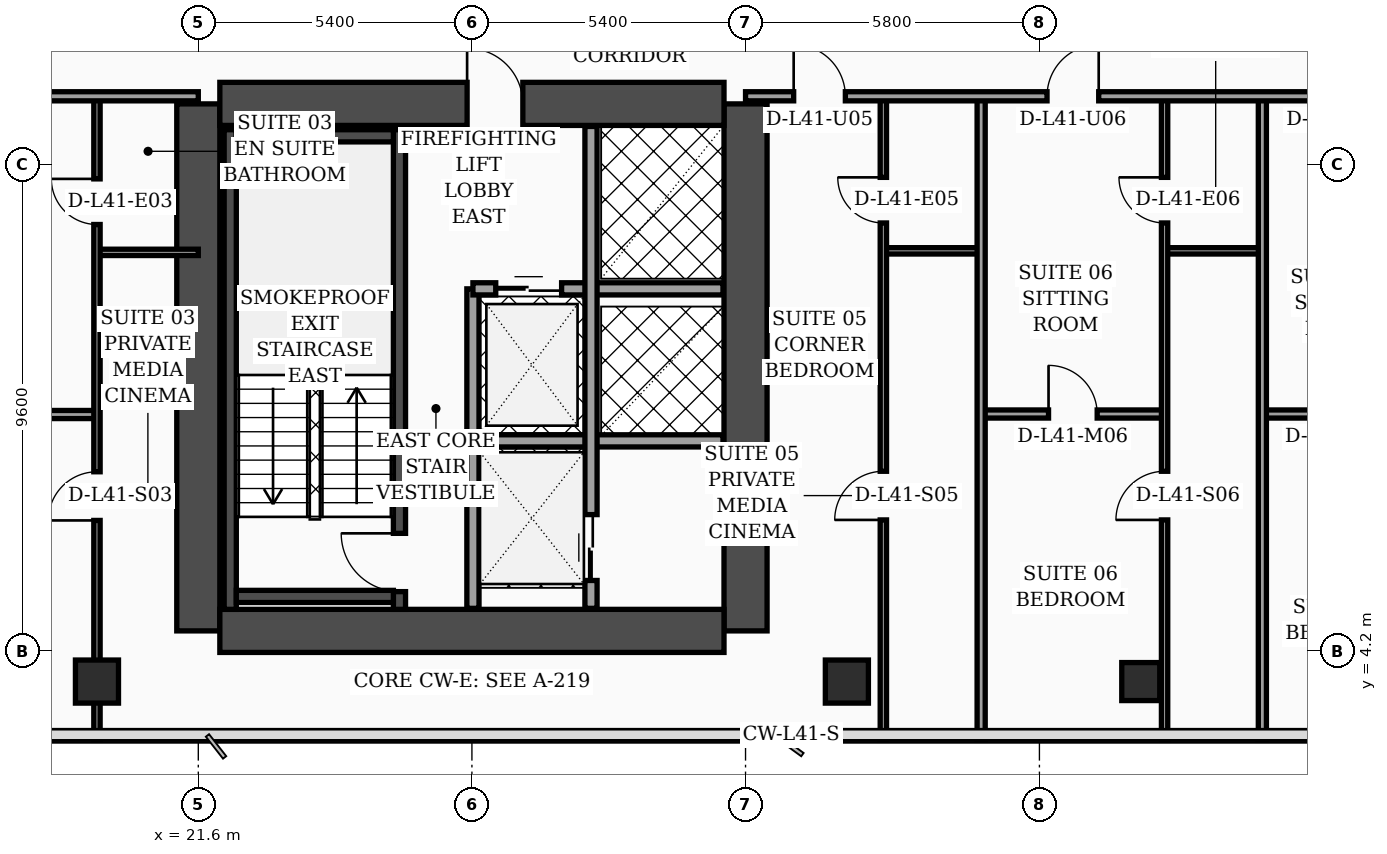
"""IFC4 building model, lengths in metres.
Left out: names, types, materials, properties, quantities, classifications, styles, units other than length and angle.
Written with IfcOpenShell. Run it as: python <this file> out.ifc"""

import sys

from ifc_helpers import new_model, si_unit, direction, frame, frame_2d, origin, origin_2d, place, context, subcontext, project, spatial, rectangle, hollow_rectangle, extrude, element, fill, save


model = new_model("IFC4")
c1 = context("Model", 3, precision=1e-05, world=origin(), true_north=direction((0.0, 1.0)))
c2 = subcontext(c1, "Body", "Model", "MODEL_VIEW")
j1 = project(units=[si_unit("LENGTHUNIT", "METRE"), si_unit("PLANEANGLEUNIT", "RADIAN")], contexts=[c1])
p1 = place(None, origin())
s1 = spatial("IfcSite", under=j1, at=p1, CompositionType="ELEMENT")
p2 = place(p1, origin())
s2 = spatial("IfcBuilding", under=s1, at=p2, CompositionType="ELEMENT")
p3 = place(p2, frame((0.0, 0.0, 167.5)))
s3 = spatial("IfcBuildingStorey", under=s2, at=p3, CompositionType="ELEMENT", Elevation=167.5)
for number, where, z_axis, x_axis in (
    (1, (21.6, 4.6, 0.0), (0.0, 0.0, 1.0), (0.0, 1.0, 0.0)),
    (2, (32.4, 4.6, 0.0), (0.0, 0.0, 1.0), (0.0, 1.0, 0.0)),
):
    element("IfcWall", number, at=place(p3, frame(where, z_axis=z_axis, x_axis=x_axis)), inside=s3, PredefinedType="SHEAR", context=c2, shape_type="SweptSolid", body=[
        extrude(rectangle(XDim=10.4, YDim=0.85, at=frame_2d((5.2, 0.0))), origin(), (0.0, 0.0, 1.0), 3.56),
    ])
p4 = place(p3, frame((22.025, 15.0, 0.0), z_axis=(0.0, 0.0, 1.0), x_axis=(1.0, 0.0, 0.0)))
e3 = element("IfcWall", 3, at=p4, inside=s3, PredefinedType="SHEAR", context=c2, shape_type="SweptSolid", body=[
    extrude(rectangle(XDim=9.95, YDim=0.85, at=frame_2d((4.975, 0.0))), origin(), (0.0, 0.0, 1.0), 3.56),
])
p5 = place(p4, frame((4.88, 0.0, 0.0)))
e4 = element("IfcOpeningElement", 4, at=p5, cuts=e3, PredefinedType="OPENING", context=c2, shape_type="SweptSolid", body=[
    extrude(rectangle(XDim=1.1, YDim=2.2, at=frame_2d((0.55, 1.1))), frame((0.0, 0.435, 0.0), z_axis=(0.0, -1.0, 0.0), x_axis=(1.0, 0.0, 0.0)), (0.0, 0.0, 1.0), 0.87),
])
p6 = place(p3, frame((22.025, 4.6, 0.0), z_axis=(0.0, 0.0, 1.0), x_axis=(1.0, 0.0, 0.0)))
e5 = element("IfcWall", 5, at=p6, inside=s3, PredefinedType="SHEAR", context=c2, shape_type="SweptSolid", body=[
    extrude(rectangle(XDim=9.95, YDim=0.85, at=frame_2d((4.975, 0.0))), origin(), (0.0, 0.0, 1.0), 3.56),
])
p7 = place(p3, frame((22.23, 5.025, 0.0), z_axis=(0.0, 0.0, 1.0), x_axis=(0.0, 1.0, 0.0)))
e6 = element("IfcWall", 6, at=p7, inside=s3, PredefinedType="SOLIDWALL", context=c2, shape_type="SweptSolid", body=[
    extrude(rectangle(XDim=9.465, YDim=0.24, at=frame_2d((4.732, 0.0))), origin(), (0.0, 0.0, 1.0), 3.56),
])
p8 = place(p3, frame((25.57, 5.025, 0.0), z_axis=(0.0, 0.0, 1.0), x_axis=(0.0, 1.0, 0.0)))
e7 = element("IfcWall", 7, at=p8, inside=s3, PredefinedType="SOLIDWALL", context=c2, shape_type="SweptSolid", body=[
    extrude(rectangle(XDim=9.465, YDim=0.24, at=frame_2d((4.732, 0.0))), origin(), (0.0, 0.0, 1.0), 3.56),
])
p9 = place(p8, frame((0.35, 0.0, 0.0)))
e8 = element("IfcOpeningElement", 8, at=p9, cuts=e7, PredefinedType="OPENING", context=c2, shape_type="SweptSolid", body=[
    extrude(rectangle(XDim=1.15, YDim=2.2, at=frame_2d((0.575, 1.1))), frame((0.0, 0.13, 0.0), z_axis=(0.0, -1.0, 0.0), x_axis=(1.0, 0.0, 0.0)), (0.0, 0.0, 1.0), 0.26),
])
for number, where, z_axis, x_axis in (
    (9, (22.35, 5.28, 0.0), (0.0, 0.0, 1.0), (1.0, 0.0, 0.0)),
    (10, (22.35, 14.37, 0.0), (0.0, 0.0, 1.0), (1.0, 0.0, 0.0)),
):
    element("IfcWall", number, at=place(p3, frame(where, z_axis=z_axis, x_axis=x_axis)), inside=s3, PredefinedType="SOLIDWALL", context=c2, shape_type="SweptSolid", body=[
        extrude(rectangle(XDim=3.1, YDim=0.24, at=frame_2d((1.55, 0.0))), origin(), (0.0, 0.0, 1.0), 3.56),
    ])
for number, where, z_axis, x_axis in (
    (11, (19.6, 3.6, 0.0), (0.0, 0.0, 1.0), (1.0, 0.0, 0.0)),
    (12, (34.4, 3.6, 0.0), (0.0, 0.0, 1.0), (1.0, 0.0, 0.0)),
):
    element("IfcColumn", number, at=place(p3, frame(where, z_axis=z_axis, x_axis=x_axis)), inside=s3, PredefinedType="COLUMN", context=c2, shape_type="SweptSolid", body=[
        extrude(hollow_rectangle(XDim=0.85, YDim=0.85, WallThickness=0.036, at=origin_2d()), origin(), (0.0, 0.0, 1.0), 3.56),
    ])
p10 = place(p3, frame((40.2, 3.6, 0.0), z_axis=(0.0, 0.0, 1.0), x_axis=(1.0, 0.0, 0.0)))
e13 = element("IfcColumn", 13, at=p10, inside=s3, PredefinedType="COLUMN", context=c2, shape_type="SweptSolid", body=[
    extrude(hollow_rectangle(XDim=0.75, YDim=0.75, WallThickness=0.032, at=origin_2d()), origin(), (0.0, 0.0, 1.0), 3.56),
])
p11 = place(p3, frame((27.02, 5.045, 0.0), z_axis=(0.0, 0.0, 1.0), x_axis=(0.0, 1.0, 0.0)))
e14 = element("IfcWall", 14, at=p11, inside=s3, PredefinedType="SOLIDWALL", context=c2, shape_type="SweptSolid", body=[
    extrude(rectangle(XDim=6.305, YDim=0.24, at=frame_2d((3.153, 0.0))), origin(), (0.0, 0.0, 1.0), 3.56),
])
p12 = place(p3, frame((27.02, 11.35, 0.0), z_axis=(0.0, 0.0, 1.0), x_axis=(1.0, 0.0, 0.0)))
e15 = element("IfcWall", 15, at=p12, inside=s3, PredefinedType="SOLIDWALL", context=c2, shape_type="SweptSolid", body=[
    extrude(rectangle(XDim=4.935, YDim=0.24, at=frame_2d((2.468, 0.0))), origin(), (0.0, 0.0, 1.0), 3.56),
])
p13 = place(p12, frame((0.45, 0.0, 0.0)))
e16 = element("IfcOpeningElement", 16, at=p13, cuts=e15, PredefinedType="OPENING", context=c2, shape_type="SweptSolid", body=[
    extrude(rectangle(XDim=1.3, YDim=2.35, at=frame_2d((0.65, 1.175))), frame((0.0, 0.13, 0.0), z_axis=(0.0, -1.0, 0.0), x_axis=(1.0, 0.0, 0.0)), (0.0, 0.0, 1.0), 0.26),
])
p14 = place(p3, frame((27.02, 8.35, 0.0), z_axis=(0.0, 0.0, 1.0), x_axis=(1.0, 0.0, 0.0)))
e17 = element("IfcWall", 17, at=p14, inside=s3, PredefinedType="SOLIDWALL", context=c2, shape_type="SweptSolid", body=[
    extrude(rectangle(XDim=4.935, YDim=0.24, at=frame_2d((2.468, 0.0))), origin(), (0.0, 0.0, 1.0), 3.09),
])
p15 = place(p3, frame((29.35, 5.045, 0.0), z_axis=(0.0, 0.0, 1.0), x_axis=(0.0, 1.0, 0.0)))
e18 = element("IfcWall", 18, at=p15, inside=s3, PredefinedType="SOLIDWALL", context=c2, shape_type="SweptSolid", body=[
    extrude(rectangle(XDim=9.51, YDim=0.24, at=frame_2d((4.755, 0.0))), origin(), (0.0, 0.0, 1.0), 3.56),
])
p16 = place(p15, frame((0.55, 0.0, 0.0)))
e19 = element("IfcOpeningElement", 19, at=p16, cuts=e18, PredefinedType="OPENING", context=c2, shape_type="SweptSolid", body=[
    extrude(rectangle(XDim=1.3, YDim=2.35, at=frame_2d((0.65, 1.175))), frame((0.0, 0.13, 0.0), z_axis=(0.0, -1.0, 0.0), x_axis=(1.0, 0.0, 0.0)), (0.0, 0.0, 1.0), 0.26),
])
p17 = place(p3, frame((19.6, 12.07, 0.0), z_axis=(0.0, 0.0, 1.0), x_axis=(1.0, 0.0, 0.0)))
e20 = element("IfcWall", 20, at=p17, inside=s3, PredefinedType="PARTITIONING", context=c2, shape_type="SweptSolid", body=[
    extrude(rectangle(XDim=2.0, YDim=0.125, at=frame_2d((1.0, 0.0))), origin(), (0.0, 0.0, 1.0), 3.56),
])
p18 = place(p3, frame((15.15, 8.87, 0.0), z_axis=(0.0, 0.0, 1.0), x_axis=(1.0, 0.0, 0.0)))
e21 = element("IfcWall", 21, at=p18, inside=s3, PredefinedType="PARTITIONING", context=c2, shape_type="SweptSolid", body=[
    extrude(rectangle(XDim=4.45, YDim=0.16, at=frame_2d((2.225, 0.0))), origin(), (0.0, 0.0, 1.0), 3.56),
])
p19 = place(p18, frame((1.75, 0.0, 0.0)))
e22 = element("IfcOpeningElement", 22, at=p19, cuts=e21, PredefinedType="OPENING", context=c2, shape_type="SweptSolid", body=[
    extrude(rectangle(XDim=0.96, YDim=2.2, at=frame_2d((0.48, 1.1))), frame((0.0, 0.09, 0.0), z_axis=(0.0, -1.0, 0.0), x_axis=(1.0, 0.0, 0.0)), (0.0, 0.0, 1.0), 0.18),
])
p20 = place(p3, frame((19.6, 2.44, 0.0), z_axis=(0.0, 0.0, 1.0), x_axis=(0.0, 1.0, 0.0)))
e23 = element("IfcWall", 23, at=p20, inside=s3, PredefinedType="PARTITIONING", context=c2, shape_type="SweptSolid", body=[
    extrude(rectangle(XDim=12.71, YDim=0.125, at=frame_2d((6.355, 0.0))), origin(), (0.0, 0.0, 1.0), 2.49),
])
p21 = place(p20, frame((4.34, 0.0, 0.0)))
e24 = element("IfcOpeningElement", 24, at=p21, cuts=e23, PredefinedType="OPENING", context=c2, shape_type="SweptSolid", body=[
    extrude(rectangle(XDim=0.96, YDim=2.2, at=frame_2d((0.48, 1.1))), frame((0.0, 0.073, 0.0), z_axis=(0.0, -1.0, 0.0), x_axis=(1.0, 0.0, 0.0)), (0.0, 0.0, 1.0), 0.145),
])
p22 = place(p20, frame((10.18, 0.0, 0.0)))
e25 = element("IfcOpeningElement", 25, at=p22, cuts=e23, PredefinedType="OPENING", context=c2, shape_type="SweptSolid", body=[
    extrude(rectangle(XDim=0.9, YDim=2.15, at=frame_2d((0.45, 1.075))), frame((0.0, 0.073, 0.0), z_axis=(0.0, -1.0, 0.0), x_axis=(1.0, 0.0, 0.0)), (0.0, 0.0, 1.0), 0.145),
])
p23 = place(p3, frame((15.15, 15.15, 0.0), z_axis=(0.0, 0.0, 1.0), x_axis=(1.0, 0.0, 0.0)))
e26 = element("IfcWall", 26, at=p23, inside=s3, PredefinedType="PARTITIONING", context=c2, shape_type="SweptSolid", body=[
    extrude(rectangle(XDim=6.45, YDim=0.18, at=frame_2d((3.225, 0.0))), origin(), (0.0, 0.0, 1.0), 2.49),
])
p24 = place(p23, frame((1.74, 0.0, 0.0)))
e27 = element("IfcOpeningElement", 27, at=p24, cuts=e26, PredefinedType="OPENING", context=c2, shape_type="SweptSolid", body=[
    extrude(rectangle(XDim=1.02, YDim=2.2, at=frame_2d((0.51, 1.1))), frame((0.0, 0.1, 0.0), z_axis=(0.0, -1.0, 0.0), x_axis=(1.0, 0.0, 0.0)), (0.0, 0.0, 1.0), 0.2),
])
p25 = place(p3, frame((35.12, 12.1, 0.0), z_axis=(0.0, 0.0, 1.0), x_axis=(1.0, 0.0, 0.0)))
e28 = element("IfcWall", 28, at=p25, inside=s3, PredefinedType="PARTITIONING", context=c2, shape_type="SweptSolid", body=[
    extrude(rectangle(XDim=1.93, YDim=0.125, at=frame_2d((0.965, 0.0))), origin(), (0.0, 0.0, 1.0), 3.56),
])
p26 = place(p3, frame((35.12, 2.44, 0.0), z_axis=(0.0, 0.0, 1.0), x_axis=(0.0, 1.0, 0.0)))
e29 = element("IfcWall", 29, at=p26, inside=s3, PredefinedType="PARTITIONING", context=c2, shape_type="SweptSolid", body=[
    extrude(rectangle(XDim=12.71, YDim=0.125, at=frame_2d((6.355, 0.0))), origin(), (0.0, 0.0, 1.0), 2.94),
])
p27 = place(p26, frame((4.35, 0.0, 0.0)))
e30 = element("IfcOpeningElement", 30, at=p27, cuts=e29, PredefinedType="OPENING", context=c2, shape_type="SweptSolid", body=[
    extrude(rectangle(XDim=0.96, YDim=2.2, at=frame_2d((0.48, 1.1))), frame((0.0, 0.073, 0.0), z_axis=(0.0, -1.0, 0.0), x_axis=(1.0, 0.0, 0.0)), (0.0, 0.0, 1.0), 0.145),
])
p28 = place(p26, frame((10.21, 0.0, 0.0)))
e31 = element("IfcOpeningElement", 31, at=p28, cuts=e29, PredefinedType="OPENING", context=c2, shape_type="SweptSolid", body=[
    extrude(rectangle(XDim=0.9, YDim=2.15, at=frame_2d((0.45, 1.075))), frame((0.0, 0.073, 0.0), z_axis=(0.0, -1.0, 0.0), x_axis=(1.0, 0.0, 0.0)), (0.0, 0.0, 1.0), 0.145),
])
p29 = place(p3, frame((40.67, 12.1, 0.0), z_axis=(0.0, 0.0, 1.0), x_axis=(1.0, 0.0, 0.0)))
e32 = element("IfcWall", 32, at=p29, inside=s3, PredefinedType="PARTITIONING", context=c2, shape_type="SweptSolid", body=[
    extrude(rectangle(XDim=1.93, YDim=0.125, at=frame_2d((0.965, 0.0))), origin(), (0.0, 0.0, 1.0), 3.56),
])
p30 = place(p3, frame((37.05, 8.88, 0.0), z_axis=(0.0, 0.0, 1.0), x_axis=(1.0, 0.0, 0.0)))
e33 = element("IfcWall", 33, at=p30, inside=s3, PredefinedType="PARTITIONING", context=c2, shape_type="SweptSolid", body=[
    extrude(rectangle(XDim=3.62, YDim=0.16, at=frame_2d((1.81, 0.0))), origin(), (0.0, 0.0, 1.0), 2.94),
])
p31 = place(p30, frame((1.33, 0.0, 0.0)))
e34 = element("IfcOpeningElement", 34, at=p31, cuts=e33, PredefinedType="OPENING", context=c2, shape_type="SweptSolid", body=[
    extrude(rectangle(XDim=0.96, YDim=2.2, at=frame_2d((0.48, 1.1))), frame((0.0, 0.09, 0.0), z_axis=(0.0, -1.0, 0.0), x_axis=(1.0, 0.0, 0.0)), (0.0, 0.0, 1.0), 0.18),
])
p32 = place(p3, frame((40.67, 2.44, 0.0), z_axis=(0.0, 0.0, 1.0), x_axis=(0.0, 1.0, 0.0)))
e35 = element("IfcWall", 35, at=p32, inside=s3, PredefinedType="PARTITIONING", context=c2, shape_type="SweptSolid", body=[
    extrude(rectangle(XDim=12.71, YDim=0.125, at=frame_2d((6.355, 0.0))), origin(), (0.0, 0.0, 1.0), 2.94),
])
p33 = place(p32, frame((4.35, 0.0, 0.0)))
e36 = element("IfcOpeningElement", 36, at=p33, cuts=e35, PredefinedType="OPENING", context=c2, shape_type="SweptSolid", body=[
    extrude(rectangle(XDim=0.96, YDim=2.2, at=frame_2d((0.48, 1.1))), frame((0.0, 0.073, 0.0), z_axis=(0.0, -1.0, 0.0), x_axis=(1.0, 0.0, 0.0)), (0.0, 0.0, 1.0), 0.145),
])
p34 = place(p32, frame((10.21, 0.0, 0.0)))
e37 = element("IfcOpeningElement", 37, at=p34, cuts=e35, PredefinedType="OPENING", context=c2, shape_type="SweptSolid", body=[
    extrude(rectangle(XDim=0.9, YDim=2.15, at=frame_2d((0.45, 1.075))), frame((0.0, 0.073, 0.0), z_axis=(0.0, -1.0, 0.0), x_axis=(1.0, 0.0, 0.0)), (0.0, 0.0, 1.0), 0.145),
])
p35 = place(p3, frame((37.05, 2.44, 0.0), z_axis=(0.0, 0.0, 1.0), x_axis=(0.0, 1.0, 0.0)))
e38 = element("IfcWall", 38, at=p35, inside=s3, PredefinedType="PARTITIONING", context=c2, shape_type="SweptSolid", body=[
    extrude(rectangle(XDim=12.71, YDim=0.16, at=frame_2d((6.355, 0.0))), origin(), (0.0, 0.0, 1.0), 2.94),
])
p36 = place(p3, frame((42.6, 8.88, 0.0), z_axis=(0.0, 0.0, 1.0), x_axis=(1.0, 0.0, 0.0)))
e39 = element("IfcWall", 39, at=p36, inside=s3, PredefinedType="PARTITIONING", context=c2, shape_type="SweptSolid", body=[
    extrude(rectangle(XDim=3.07, YDim=0.16, at=frame_2d((1.535, 0.0))), origin(), (0.0, 0.0, 1.0), 3.09),
])
p37 = place(p36, frame((1.06, 0.0, 0.0)))
e40 = element("IfcOpeningElement", 40, at=p37, cuts=e39, PredefinedType="OPENING", context=c2, shape_type="SweptSolid", body=[
    extrude(rectangle(XDim=0.96, YDim=2.2, at=frame_2d((0.48, 1.1))), frame((0.0, 0.09, 0.0), z_axis=(0.0, -1.0, 0.0), x_axis=(1.0, 0.0, 0.0)), (0.0, 0.0, 1.0), 0.18),
])
p38 = place(p3, frame((42.6, 2.44, 0.0), z_axis=(0.0, 0.0, 1.0), x_axis=(0.0, 1.0, 0.0)))
e41 = element("IfcWall", 41, at=p38, inside=s3, PredefinedType="PARTITIONING", context=c2, shape_type="SweptSolid", body=[
    extrude(rectangle(XDim=12.71, YDim=0.16, at=frame_2d((6.355, 0.0))), origin(), (0.0, 0.0, 1.0), 3.04),
])
p39 = place(p3, frame((32.4, 15.15, 0.0), z_axis=(0.0, 0.0, 1.0), x_axis=(1.0, 0.0, 0.0)))
e42 = element("IfcWall", 42, at=p39, inside=s3, PredefinedType="PARTITIONING", context=c2, shape_type="SweptSolid", body=[
    extrude(rectangle(XDim=20.2, YDim=0.18, at=frame_2d((10.1, 0.0))), origin(), (0.0, 0.0, 1.0), 2.94),
])
p40 = place(p39, frame((0.95, 0.0, 0.0)))
e43 = element("IfcOpeningElement", 43, at=p40, cuts=e42, PredefinedType="OPENING", context=c2, shape_type="SweptSolid", body=[
    extrude(rectangle(XDim=1.02, YDim=2.2, at=frame_2d((0.51, 1.1))), frame((0.0, 0.1, 0.0), z_axis=(0.0, -1.0, 0.0), x_axis=(1.0, 0.0, 0.0)), (0.0, 0.0, 1.0), 0.2),
])
p41 = place(p39, frame((5.95, 0.0, 0.0)))
e44 = element("IfcOpeningElement", 44, at=p41, cuts=e42, PredefinedType="OPENING", context=c2, shape_type="SweptSolid", body=[
    extrude(rectangle(XDim=1.02, YDim=2.2, at=frame_2d((0.51, 1.1))), frame((0.0, 0.1, 0.0), z_axis=(0.0, -1.0, 0.0), x_axis=(1.0, 0.0, 0.0)), (0.0, 0.0, 1.0), 0.2),
])
p42 = place(p39, frame((11.22, 0.0, 0.0)))
e45 = element("IfcOpeningElement", 45, at=p42, cuts=e42, PredefinedType="OPENING", context=c2, shape_type="SweptSolid", body=[
    extrude(rectangle(XDim=1.02, YDim=2.2, at=frame_2d((0.51, 1.1))), frame((0.0, 0.1, 0.0), z_axis=(0.0, -1.0, 0.0), x_axis=(1.0, 0.0, 0.0)), (0.0, 0.0, 1.0), 0.2),
])
p43 = place(p39, frame((16.22, 0.0, 0.0)))
e46 = element("IfcOpeningElement", 46, at=p43, cuts=e42, PredefinedType="OPENING", context=c2, shape_type="SweptSolid", body=[
    extrude(rectangle(XDim=1.02, YDim=2.2, at=frame_2d((0.51, 1.1))), frame((0.0, 0.1, 0.0), z_axis=(0.0, -1.0, 0.0), x_axis=(1.0, 0.0, 0.0)), (0.0, 0.0, 1.0), 0.2),
])
p44 = place(p13, origin())
e47 = element("IfcDoor", 47, at=p44, inside=s3, OperationType="DOUBLE_DOOR_SLIDING", PredefinedType="DOOR", context=c2, shape_type="SweptSolid", body=[
    extrude(rectangle(XDim=1.3, YDim=2.35, at=frame_2d((0.65, 1.175))), frame((0.0, 0.025, 0.0), z_axis=(0.0, -1.0, 0.0), x_axis=(1.0, 0.0, 0.0)), (0.0, 0.0, 1.0), 0.05),
])
fill(e16, e47)
p45 = place(p16, origin())
e48 = element("IfcDoor", 48, at=p45, inside=s3, OperationType="DOUBLE_DOOR_SLIDING", PredefinedType="DOOR", context=c2, shape_type="SweptSolid", body=[
    extrude(rectangle(XDim=1.3, YDim=2.35, at=frame_2d((0.65, 1.175))), frame((0.0, 0.025, 0.0), z_axis=(0.0, -1.0, 0.0), x_axis=(1.0, 0.0, 0.0)), (0.0, 0.0, 1.0), 0.05),
])
fill(e19, e48)
p46 = place(p21, origin())
e49 = element("IfcDoor", 49, at=p46, inside=s3, OperationType="SINGLE_SWING_LEFT", PredefinedType="DOOR", context=c2, shape_type="SweptSolid", body=[
    extrude(rectangle(XDim=0.96, YDim=2.2, at=frame_2d((0.48, 1.1))), frame((0.0, 0.025, 0.0), z_axis=(0.0, -1.0, 0.0), x_axis=(1.0, 0.0, 0.0)), (0.0, 0.0, 1.0), 0.05),
])
fill(e24, e49)
p47 = place(p22, origin())
e50 = element("IfcDoor", 50, at=p47, inside=s3, OperationType="SINGLE_SWING_RIGHT", PredefinedType="DOOR", context=c2, shape_type="SweptSolid", body=[
    extrude(rectangle(XDim=0.9, YDim=2.15, at=frame_2d((0.45, 1.075))), frame((0.0, 0.025, 0.0), z_axis=(0.0, -1.0, 0.0), x_axis=(1.0, 0.0, 0.0)), (0.0, 0.0, 1.0), 0.05),
])
fill(e25, e50)
p48 = place(p27, origin())
e51 = element("IfcDoor", 51, at=p48, inside=s3, OperationType="SINGLE_SWING_LEFT", PredefinedType="DOOR", context=c2, shape_type="SweptSolid", body=[
    extrude(rectangle(XDim=0.96, YDim=2.2, at=frame_2d((0.48, 1.1))), frame((0.0, 0.025, 0.0), z_axis=(0.0, -1.0, 0.0), x_axis=(1.0, 0.0, 0.0)), (0.0, 0.0, 1.0), 0.05),
])
fill(e30, e51)
p49 = place(p28, origin())
e52 = element("IfcDoor", 52, at=p49, inside=s3, OperationType="SINGLE_SWING_RIGHT", PredefinedType="DOOR", context=c2, shape_type="SweptSolid", body=[
    extrude(rectangle(XDim=0.9, YDim=2.15, at=frame_2d((0.45, 1.075))), frame((0.0, 0.025, 0.0), z_axis=(0.0, -1.0, 0.0), x_axis=(1.0, 0.0, 0.0)), (0.0, 0.0, 1.0), 0.05),
])
fill(e31, e52)
p50 = place(p31, origin())
e53 = element("IfcDoor", 53, at=p50, inside=s3, OperationType="SINGLE_SWING_LEFT", PredefinedType="DOOR", context=c2, shape_type="SweptSolid", body=[
    extrude(rectangle(XDim=0.96, YDim=2.2, at=frame_2d((0.48, 1.1))), frame((0.0, 0.025, 0.0), z_axis=(0.0, -1.0, 0.0), x_axis=(1.0, 0.0, 0.0)), (0.0, 0.0, 1.0), 0.05),
])
fill(e34, e53)
p51 = place(p33, origin())
e54 = element("IfcDoor", 54, at=p51, inside=s3, OperationType="SINGLE_SWING_LEFT", PredefinedType="DOOR", context=c2, shape_type="SweptSolid", body=[
    extrude(rectangle(XDim=0.96, YDim=2.2, at=frame_2d((0.48, 1.1))), frame((0.0, 0.025, 0.0), z_axis=(0.0, -1.0, 0.0), x_axis=(1.0, 0.0, 0.0)), (0.0, 0.0, 1.0), 0.05),
])
fill(e36, e54)
p52 = place(p34, origin())
e55 = element("IfcDoor", 55, at=p52, inside=s3, OperationType="SINGLE_SWING_RIGHT", PredefinedType="DOOR", context=c2, shape_type="SweptSolid", body=[
    extrude(rectangle(XDim=0.9, YDim=2.15, at=frame_2d((0.45, 1.075))), frame((0.0, 0.025, 0.0), z_axis=(0.0, -1.0, 0.0), x_axis=(1.0, 0.0, 0.0)), (0.0, 0.0, 1.0), 0.05),
])
fill(e37, e55)
p53 = place(p40, origin())
e56 = element("IfcDoor", 56, at=p53, inside=s3, OperationType="SINGLE_SWING_LEFT", PredefinedType="DOOR", context=c2, shape_type="SweptSolid", body=[
    extrude(rectangle(XDim=1.02, YDim=2.2, at=frame_2d((0.51, 1.1))), frame((0.0, 0.025, 0.0), z_axis=(0.0, -1.0, 0.0), x_axis=(1.0, 0.0, 0.0)), (0.0, 0.0, 1.0), 0.05),
])
fill(e43, e56)
p54 = place(p41, origin())
e57 = element("IfcDoor", 57, at=p54, inside=s3, OperationType="SINGLE_SWING_RIGHT", PredefinedType="DOOR", context=c2, shape_type="SweptSolid", body=[
    extrude(rectangle(XDim=1.02, YDim=2.2, at=frame_2d((0.51, 1.1))), frame((0.0, 0.025, 0.0), z_axis=(0.0, -1.0, 0.0), x_axis=(1.0, 0.0, 0.0)), (0.0, 0.0, 1.0), 0.05),
])
fill(e44, e57)
p55 = place(p9, origin())
e58 = element("IfcDoor", 58, at=p55, inside=s3, OperationType="SINGLE_SWING_RIGHT", PredefinedType="DOOR", context=c2, shape_type="SweptSolid", body=[
    extrude(rectangle(XDim=1.15, YDim=2.2, at=frame_2d((0.575, 1.1))), frame((0.0, 0.025, 0.0), z_axis=(0.0, -1.0, 0.0), x_axis=(1.0, 0.0, 0.0)), (0.0, 0.0, 1.0), 0.05),
])
fill(e8, e58)
p56 = place(p5, origin())
e59 = element("IfcDoor", 59, at=p56, inside=s3, OperationType="SINGLE_SWING_LEFT", PredefinedType="DOOR", context=c2, shape_type="SweptSolid", body=[
    extrude(rectangle(XDim=1.1, YDim=2.2, at=frame_2d((0.55, 1.1))), frame((0.0, 0.025, 0.0), z_axis=(0.0, -1.0, 0.0), x_axis=(1.0, 0.0, 0.0)), (0.0, 0.0, 1.0), 0.05),
])
fill(e4, e59)
save(model, sys.argv[1])
